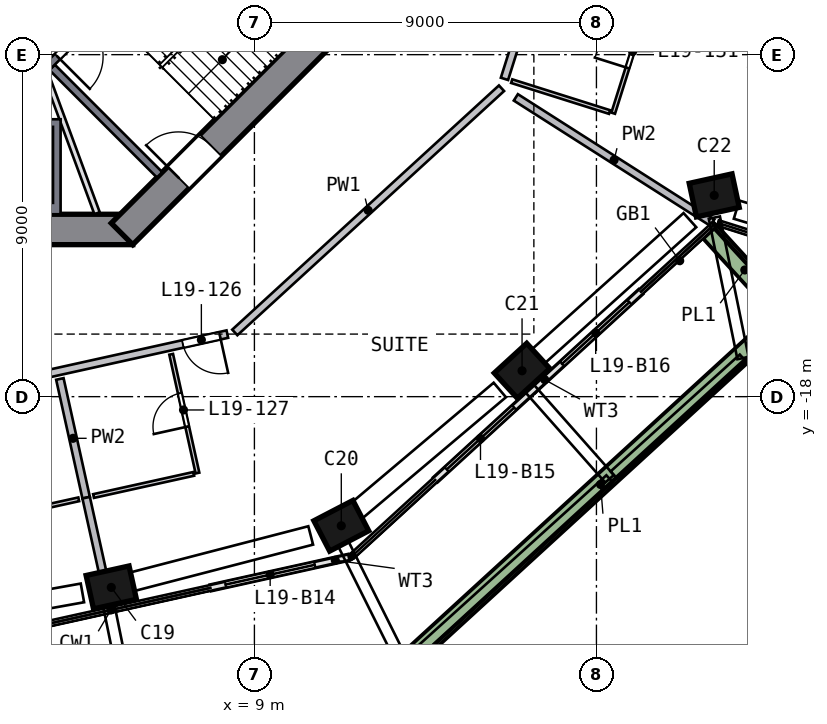
"""IFC4 building model, lengths in metres.
Left out: names, types, materials, properties, quantities, classifications, styles, units other than length and angle.
Written with IfcOpenShell. Run it as: python <this file> out.ifc"""

import sys

from ifc_helpers import new_model, si_unit, direction, frame, frame_2d, origin, origin_2d, place, context, subcontext, project, spatial, polyline, rectangle, outline, extrude, element, fill, save


model = new_model("IFC4")
c1 = context("Model", 3, precision=1e-05, world=origin(), true_north=direction((0.0, 1.0)))
c2 = subcontext(c1, "Body", "Model", "MODEL_VIEW")
j1 = project(units=[si_unit("LENGTHUNIT", "METRE"), si_unit("PLANEANGLEUNIT", "RADIAN")], contexts=[c1])
p1 = place(None, origin())
s1 = spatial("IfcSite", under=j1, at=p1, CompositionType="ELEMENT")
p2 = place(p1, origin())
s2 = spatial("IfcBuilding", under=s1, at=p2, CompositionType="ELEMENT")
p3 = place(p2, frame((0.0, 0.0, 86.0)))
s3 = spatial("IfcBuildingStorey", under=s2, at=p3, CompositionType="ELEMENT", Elevation=86.0)
p4 = place(p3, frame((5.102, -23.051, 0.0), z_axis=(0.109436366, 0.025248696, 0.993673078), x_axis=(0.970098725, 0.215163997, -0.112307249)))
e1 = element("IfcColumn", 1, at=p4, inside=s3, PredefinedType="COLUMN", context=c2, shape_type="SweptSolid", body=[
    extrude(rectangle(XDim=1.15, YDim=0.9, at=origin_2d()), origin(), (0.0, 0.0, 1.0), 3.21),
])
p5 = place(p3, frame((11.163, -21.463, 0.0), z_axis=(0.101646695, 0.053978424, 0.993355062), x_axis=(-0.881248043, -0.458428957, 0.115085963)))
e2 = element("IfcColumn", 2, at=p5, inside=s3, PredefinedType="COLUMN", context=c2, shape_type="SweptSolid", body=[
    extrude(rectangle(XDim=1.15, YDim=0.9, at=origin_2d()), origin(), (0.0, 0.0, 1.0), 3.211),
])
p6 = place(p3, frame((15.944, -17.412, 0.0), z_axis=(0.08213443, 0.076582751, 0.993674503), x_axis=(0.732490696, 0.671451632, -0.112294638)))
e3 = element("IfcColumn", 3, at=p6, inside=s3, PredefinedType="COLUMN", context=c2, shape_type="SweptSolid", body=[
    extrude(rectangle(XDim=1.15, YDim=0.9, at=origin_2d()), origin(), (0.0, 0.0, 1.0), 3.21),
])
p7 = place(p3, frame((21.027, -12.825, 0.0), z_axis=(0.060122333, 0.100482585, 0.993120615), x_axis=(-0.974668145, -0.20880815, 0.080132166)))
e4 = element("IfcColumn", 4, at=p7, inside=s3, PredefinedType="COLUMN", context=c2, shape_type="SweptSolid", body=[
    extrude(rectangle(XDim=1.15, YDim=0.9, at=origin_2d()), origin(), (0.0, 0.0, 1.0), 3.212),
])
p8 = place(p3, frame((-5.799, -13.6, 0.0), z_axis=(0.0, 0.0, 1.0), x_axis=(1.0, 0.0, 0.0)))
e5 = element("IfcWall", 5, at=p8, inside=s3, PredefinedType="SHEAR", context=c2, shape_type="SweptSolid", body=[
    extrude(rectangle(XDim=11.598, YDim=0.8, at=frame_2d((5.799, 0.0))), origin(), (0.0, 0.0, 1.0), 3.5),
])
p9 = place(p8, frame((4.899, 0.0, 0.0)))
e6 = element("IfcOpeningElement", 6, at=p9, cuts=e5, PredefinedType="OPENING", context=c2, shape_type="SweptSolid", body=[
    extrude(rectangle(XDim=1.8, YDim=2.1, at=frame_2d((0.9, 1.05))), frame((0.0, 0.41, 0.0), z_axis=(0.0, -1.0, 0.0), x_axis=(1.0, 0.0, 0.0)), (0.0, 0.0, 1.0), 0.82),
])
p10 = place(p3, frame((5.516, -13.717, 0.0), z_axis=(0.0, 0.0, 1.0), x_axis=(0.707106781, 0.707106781, 0.0)))
e7 = element("IfcWall", 7, at=p10, inside=s3, PredefinedType="SHEAR", context=c2, shape_type="SweptSolid", body=[
    extrude(rectangle(XDim=11.598, YDim=0.8, at=frame_2d((5.799, 0.0))), origin(), (0.0, 0.0, 1.0), 3.5),
])
p11 = place(p10, frame((2.099, 0.0, 0.0)))
e8 = element("IfcOpeningElement", 8, at=p11, cuts=e7, PredefinedType="OPENING", context=c2, shape_type="SweptSolid", body=[
    extrude(rectangle(XDim=1.2, YDim=2.1, at=frame_2d((0.6, 1.05))), frame((0.0, 0.41, 0.0), z_axis=(0.0, -1.0, 0.0), x_axis=(1.0, 0.0, 0.0)), (0.0, 0.0, 1.0), 0.82),
])
p12 = place(p3, frame((7.852, -23.031, 0.0), z_axis=(0.0, 0.0, 1.0), x_axis=(0.976372496, 0.216094304, 0.0)))
e9 = element("IfcWall", 9, at=p12, inside=s3, PredefinedType="SOLIDWALL", context=c2, shape_type="SweptSolid", body=[
    extrude(rectangle(XDim=3.71, YDim=0.15, at=frame_2d((1.855, 0.0))), origin(), (0.0, 0.0, 1.0), 2.425),
])
p13 = place(p12, frame((0.4, 0.0, 0.0)))
e10 = element("IfcOpeningElement", 10, at=p13, cuts=e9, PredefinedType="OPENING", context=c2, shape_type="SweptSolid", body=[
    extrude(rectangle(XDim=2.4, YDim=2.4, at=frame_2d((1.2, 1.2))), frame((0.0, 0.085, 0.0), z_axis=(0.0, -1.0, 0.0), x_axis=(1.0, 0.0, 0.0)), (0.0, 0.0, 1.0), 0.17),
])
p14 = place(p3, frame((13.769, -20.182, 0.0), z_axis=(0.0, 0.0, 1.0), x_axis=(0.737477764, 0.675371415, 0.0)))
e11 = element("IfcWall", 11, at=p14, inside=s3, PredefinedType="SOLIDWALL", context=c2, shape_type="SweptSolid", body=[
    extrude(rectangle(XDim=3.475, YDim=0.15, at=frame_2d((1.738, 0.0))), origin(), (0.0, 0.0, 1.0), 2.425),
])
p15 = place(p14, frame((0.4, 0.0, 0.0)))
e12 = element("IfcOpeningElement", 12, at=p15, cuts=e11, PredefinedType="OPENING", context=c2, shape_type="SweptSolid", body=[
    extrude(rectangle(XDim=2.4, YDim=2.4, at=frame_2d((1.2, 1.2))), frame((0.0, 0.085, 0.0), z_axis=(0.0, -1.0, 0.0), x_axis=(1.0, 0.0, 0.0)), (0.0, 0.0, 1.0), 0.17),
])
p16 = place(p3, frame((16.332, -17.835, 0.0), z_axis=(0.0, 0.0, 1.0), x_axis=(0.737547703, 0.675295036, 0.0)))
e13 = element("IfcWall", 13, at=p16, inside=s3, PredefinedType="SOLIDWALL", context=c2, shape_type="SweptSolid", body=[
    extrude(rectangle(XDim=3.835, YDim=0.15, at=frame_2d((1.918, 0.0))), origin(), (0.0, 0.0, 1.0), 2.425),
])
p17 = place(p16, frame((1.035, 0.0, 0.0)))
e14 = element("IfcOpeningElement", 14, at=p17, cuts=e13, PredefinedType="OPENING", context=c2, shape_type="SweptSolid", body=[
    extrude(rectangle(XDim=2.4, YDim=2.4, at=frame_2d((1.2, 1.2))), frame((0.0, 0.085, 0.0), z_axis=(0.0, -1.0, 0.0), x_axis=(1.0, 0.0, 0.0)), (0.0, 0.0, 1.0), 0.17),
])
p18 = place(p3, frame((13.047, -24.945, 0.0), z_axis=(0.0, 0.0, 1.0), x_axis=(0.737502592, 0.675344302, 0.0)))
e15 = element("IfcWall", 15, at=p18, inside=s3, PredefinedType="SOLIDWALL", context=c2, shape_type="SweptSolid", body=[
    extrude(rectangle(XDim=13.723, YDim=0.5, at=frame_2d((6.862, 0.0))), origin(), (0.0, 0.0, 1.0), 0.7),
])
p19 = place(p3, frame((22.815, -15.661, 0.0), z_axis=(0.0, 0.0, 1.0), x_axis=(-0.675257533, 0.737582039, 0.0)))
e16 = element("IfcWall", 16, at=p19, inside=s3, PredefinedType="SOLIDWALL", context=c2, shape_type="SweptSolid", body=[
    extrude(rectangle(XDim=2.699, YDim=0.5, at=frame_2d((1.35, 0.0))), origin(), (0.0, 0.0, 1.0), 0.7),
])
p20 = place(p3, origin())
e17 = element("IfcWall", 17, at=p20, inside=s3, PredefinedType="SOLIDWALL", context=c2, shape_type="SweptSolid", body=[
    extrude(outline(polyline([(3.9, -10.7), (3.9, -13.2), (1.2, -13.2), (1.2, -10.7), (3.9, -10.7)]), holes=[polyline([(1.4, -12.9), (3.7, -12.9), (3.7, -10.9), (1.4, -10.9), (1.4, -12.9)])]), origin(), (0.0, 0.0, 1.0), 3.19),
])
p21 = place(p3, frame((9.334, -3.535, 0.0), z_axis=(0.0, 0.0, 1.0), x_axis=(-0.707106781, -0.707106781, 0.0)))
e18 = element("IfcWall", 18, at=p21, inside=s3, PredefinedType="SOLIDWALL", context=c2, shape_type="SweptSolid", body=[
    extrude(rectangle(XDim=8.2, YDim=0.2, at=frame_2d((4.1, 0.0))), origin(), (0.0, 0.0, 1.0), 3.19),
])
p22 = place(p21, frame((6.6, 0.0, 0.0)))
e19 = element("IfcOpeningElement", 19, at=p22, cuts=e18, PredefinedType="OPENING", context=c2, shape_type="SweptSolid", body=[
    extrude(rectangle(XDim=1.2, YDim=2.1, at=frame_2d((0.6, 1.05))), frame((0.0, 0.11, 0.0), z_axis=(0.0, -1.0, 0.0), x_axis=(1.0, 0.0, 0.0)), (0.0, 0.0, 1.0), 0.22),
])
p23 = place(p3, frame((3.677, -9.334, 0.0), z_axis=(0.0, 0.0, 1.0), x_axis=(0.707106781, -0.707106781, 0.0)))
e20 = element("IfcWall", 20, at=p23, inside=s3, PredefinedType="SOLIDWALL", context=c2, shape_type="SweptSolid", body=[
    extrude(rectangle(XDim=4.0, YDim=0.2, at=frame_2d((2.0, 0.0))), origin(), (0.0, 0.0, 1.0), 3.19),
])
p24 = place(p3, frame((1.776, -4.813, 0.0), z_axis=(0.0, 0.0, 1.0), x_axis=(0.346115488, -0.938191915, 0.0)))
e21 = element("IfcWall", 21, at=p24, inside=s3, PredefinedType="PARTITIONING", context=c2, shape_type="SweptSolid", body=[
    extrude(rectangle(XDim=8.91, YDim=0.15, at=frame_2d((4.455, 0.0))), origin(), (0.0, 0.0, 1.0), 3.19),
])
p25 = place(p24, frame((1.4, 0.0, 0.0)))
e22 = element("IfcOpeningElement", 22, at=p25, cuts=e21, PredefinedType="OPENING", context=c2, shape_type="SweptSolid", body=[
    extrude(rectangle(XDim=1.8, YDim=2.1, at=frame_2d((0.9, 1.05))), frame((0.0, 0.085, 0.0), z_axis=(0.0, -1.0, 0.0), x_axis=(1.0, 0.0, 0.0)), (0.0, 0.0, 1.0), 0.17),
])
p26 = place(p3, frame((8.288, -16.354, 0.0), z_axis=(0.0, 0.0, 1.0), x_axis=(-0.976371341, -0.216099524, 0.0)))
e23 = element("IfcWall", 23, at=p26, inside=s3, PredefinedType="SOLIDWALL", context=c2, shape_type="SweptSolid", body=[
    extrude(rectangle(XDim=9.116, YDim=0.2, at=frame_2d((4.558, 0.0))), origin(), (0.0, 0.0, 1.0), 3.19),
])
p27 = place(p26, frame((0.2, 0.0, 0.0)))
e24 = element("IfcOpeningElement", 24, at=p27, cuts=e23, PredefinedType="OPENING", context=c2, shape_type="SweptSolid", body=[
    extrude(rectangle(XDim=1.0, YDim=2.1, at=frame_2d((0.5, 1.05))), frame((0.0, 0.11, 0.0), z_axis=(0.0, -1.0, 0.0), x_axis=(1.0, 0.0, 0.0)), (0.0, 0.0, 1.0), 0.22),
])
p28 = place(p3, frame((8.484, -16.31, 0.0), z_axis=(0.0, 0.0, 1.0), x_axis=(0.737517179, 0.675328372, 0.0)))
e25 = element("IfcWall", 25, at=p28, inside=s3, PredefinedType="SOLIDWALL", context=c2, shape_type="SweptSolid", body=[
    extrude(rectangle(XDim=9.516, YDim=0.2, at=frame_2d((4.758, 0.0))), origin(), (0.0, 0.0, 1.0), 3.19),
])
p29 = place(p3, frame((15.58, -9.637, 0.0), z_axis=(0.0, 0.0, 1.0), x_axis=(0.301086692, 0.953596772, 0.0)))
e26 = element("IfcWall", 26, at=p29, inside=s3, PredefinedType="SOLIDWALL", context=c2, shape_type="SweptSolid", body=[
    extrude(rectangle(XDim=3.4, YDim=0.2, at=frame_2d((1.7, 0.0))), origin(), (0.0, 0.0, 1.0), 3.19),
])
p30 = place(p3, frame((16.794, -6.455, 0.0), z_axis=(0.0, 0.0, 1.0), x_axis=(0.953611503, -0.301040034, 0.0)))
e27 = element("IfcWall", 27, at=p30, inside=s3, PredefinedType="SOLIDWALL", context=c2, shape_type="SweptSolid", body=[
    extrude(rectangle(XDim=13.689, YDim=0.2, at=frame_2d((6.844, 0.0))), origin(), (0.0, 0.0, 1.0), 3.19),
])
p31 = place(p3, frame((3.881, -17.534, 0.0), z_axis=(0.0, 0.0, 1.0), x_axis=(0.216057954, -0.976380541, 0.0)))
e28 = element("IfcWall", 28, at=p31, inside=s3, PredefinedType="SOLIDWALL", context=c2, shape_type="SweptSolid", body=[
    extrude(rectangle(XDim=3.2, YDim=0.2, at=frame_2d((1.6, 0.0))), origin(), (0.0, 0.0, 1.0), 3.19),
])
p32 = place(p3, frame((4.572, -20.658, 0.0), z_axis=(0.0, 0.0, 1.0), x_axis=(0.216080405, -0.976375572, 0.0)))
e29 = element("IfcWall", 29, at=p32, inside=s3, PredefinedType="SOLIDWALL", context=c2, shape_type="SweptSolid", body=[
    extrude(rectangle(XDim=2.95, YDim=0.2, at=frame_2d((1.475, 0.0))), origin(), (0.0, 0.0, 1.0), 3.19),
])
p33 = place(p3, frame((15.879, -10.124, 0.0), z_axis=(0.0, 0.0, 1.0), x_axis=(0.843220205, -0.537568308, 0.0)))
e30 = element("IfcWall", 30, at=p33, inside=s3, PredefinedType="SOLIDWALL", context=c2, shape_type="SweptSolid", body=[
    extrude(rectangle(XDim=6.132, YDim=0.2, at=frame_2d((3.066, 0.0))), origin(), (0.0, 0.0, 1.0), 3.19),
])
for number, where, z_axis, x_axis in (
    (31, (1.741, -21.285, 0.0), (0.0, 0.0, 1.0), (0.976, 0.216, 0.0)),
    (32, (7.404, -20.032, 0.0), (0.0, 0.0, 1.0), (-0.976, -0.216, 0.0)),
):
    element("IfcWall", number, at=place(p3, frame(where, z_axis=z_axis, x_axis=x_axis)), inside=s3, PredefinedType="PARTITIONING", context=c2, shape_type="SweptSolid", body=[
        extrude(rectangle(XDim=2.7, YDim=0.1, at=frame_2d((1.35, 0.0))), origin(), (0.0, 0.0, 1.0), 3.19),
    ])
p34 = place(p3, frame((7.501, -20.01, 0.0), z_axis=(0.0, 0.0, 1.0), x_axis=(-0.216146782, 0.97636088, 0.0)))
e33 = element("IfcWall", 33, at=p34, inside=s3, PredefinedType="PARTITIONING", context=c2, shape_type="SweptSolid", body=[
    extrude(rectangle(XDim=3.2, YDim=0.1, at=frame_2d((1.6, 0.0))), origin(), (0.0, 0.0, 1.0), 3.19),
])
p35 = place(p34, frame((1.25, 0.0, 0.0)))
e34 = element("IfcOpeningElement", 34, at=p35, cuts=e33, PredefinedType="OPENING", context=c2, shape_type="SweptSolid", body=[
    extrude(rectangle(XDim=0.9, YDim=2.1, at=frame_2d((0.45, 1.05))), frame((0.0, 0.06, 0.0), z_axis=(0.0, -1.0, 0.0), x_axis=(1.0, 0.0, 0.0)), (0.0, 0.0, 1.0), 0.12),
])
p36 = place(p3, frame((15.771, -9.698, 0.0), z_axis=(0.0, 0.0, 1.0), x_axis=(0.953625017, -0.30099722, 0.0)))
e35 = element("IfcWall", 35, at=p36, inside=s3, PredefinedType="PARTITIONING", context=c2, shape_type="SweptSolid", body=[
    extrude(rectangle(XDim=2.7, YDim=0.1, at=frame_2d((1.35, 0.0))), origin(), (0.0, 0.0, 1.0), 3.19),
])
p37 = place(p3, frame((18.441, -10.54, 0.0), z_axis=(0.0, 0.0, 1.0), x_axis=(0.30105834, 0.953605724, 0.0)))
e36 = element("IfcWall", 36, at=p37, inside=s3, PredefinedType="PARTITIONING", context=c2, shape_type="SweptSolid", body=[
    extrude(rectangle(XDim=3.2, YDim=0.1, at=frame_2d((1.6, 0.0))), origin(), (0.0, 0.0, 1.0), 3.19),
])
p38 = place(p37, frame((1.25, 0.0, 0.0)))
e37 = element("IfcOpeningElement", 37, at=p38, cuts=e36, PredefinedType="OPENING", context=c2, shape_type="SweptSolid", body=[
    extrude(rectangle(XDim=0.9, YDim=2.1, at=frame_2d((0.45, 1.05))), frame((0.0, 0.06, 0.0), z_axis=(0.0, -1.0, 0.0), x_axis=(1.0, 0.0, 0.0)), (0.0, 0.0, 1.0), 0.12),
])
p39 = place(p13, origin())
e38 = element("IfcDoor", 38, at=p39, inside=s3, OperationType="SLIDING_TO_RIGHT", PredefinedType="DOOR", context=c2, shape_type="SweptSolid", body=[
    extrude(rectangle(XDim=2.4, YDim=2.4, at=frame_2d((1.2, 1.2))), frame((0.0, 0.025, 0.0), z_axis=(0.0, -1.0, 0.0), x_axis=(1.0, 0.0, 0.0)), (0.0, 0.0, 1.0), 0.05),
])
fill(e10, e38)
p40 = place(p15, origin())
e39 = element("IfcDoor", 39, at=p40, inside=s3, OperationType="SLIDING_TO_RIGHT", PredefinedType="DOOR", context=c2, shape_type="SweptSolid", body=[
    extrude(rectangle(XDim=2.4, YDim=2.4, at=frame_2d((1.2, 1.2))), frame((0.0, 0.025, 0.0), z_axis=(0.0, -1.0, 0.0), x_axis=(1.0, 0.0, 0.0)), (0.0, 0.0, 1.0), 0.05),
])
fill(e12, e39)
p41 = place(p17, origin())
e40 = element("IfcDoor", 40, at=p41, inside=s3, OperationType="SLIDING_TO_LEFT", PredefinedType="DOOR", context=c2, shape_type="SweptSolid", body=[
    extrude(rectangle(XDim=2.4, YDim=2.4, at=frame_2d((1.2, 1.2))), frame((0.0, 0.025, 0.0), z_axis=(0.0, -1.0, 0.0), x_axis=(1.0, 0.0, 0.0)), (0.0, 0.0, 1.0), 0.05),
])
fill(e14, e40)
p42 = place(p22, origin())
e41 = element("IfcDoor", 41, at=p42, inside=s3, OperationType="SINGLE_SWING_RIGHT", PredefinedType="DOOR", context=c2, shape_type="SweptSolid", body=[
    extrude(rectangle(XDim=1.2, YDim=2.1, at=frame_2d((0.6, 1.05))), frame((0.0, 0.025, 0.0), z_axis=(0.0, -1.0, 0.0), x_axis=(1.0, 0.0, 0.0)), (0.0, 0.0, 1.0), 0.05),
])
fill(e19, e41)
p43 = place(p11, origin())
e42 = element("IfcDoor", 42, at=p43, inside=s3, OperationType="SINGLE_SWING_LEFT", PredefinedType="DOOR", context=c2, shape_type="SweptSolid", body=[
    extrude(rectangle(XDim=1.2, YDim=2.1, at=frame_2d((0.6, 1.05))), frame((0.0, 0.025, 0.0), z_axis=(0.0, -1.0, 0.0), x_axis=(1.0, 0.0, 0.0)), (0.0, 0.0, 1.0), 0.05),
])
fill(e8, e42)
p44 = place(p27, origin())
e43 = element("IfcDoor", 43, at=p44, inside=s3, OperationType="SINGLE_SWING_LEFT", PredefinedType="DOOR", context=c2, shape_type="SweptSolid", body=[
    extrude(rectangle(XDim=1.0, YDim=2.1, at=frame_2d((0.5, 1.05))), frame((0.0, 0.025, 0.0), z_axis=(0.0, -1.0, 0.0), x_axis=(1.0, 0.0, 0.0)), (0.0, 0.0, 1.0), 0.05),
])
fill(e24, e43)
p45 = place(p35, origin())
e44 = element("IfcDoor", 44, at=p45, inside=s3, OperationType="SINGLE_SWING_LEFT", PredefinedType="DOOR", context=c2, shape_type="SweptSolid", body=[
    extrude(rectangle(XDim=0.9, YDim=2.1, at=frame_2d((0.45, 1.05))), frame((0.0, 0.025, 0.0), z_axis=(0.0, -1.0, 0.0), x_axis=(1.0, 0.0, 0.0)), (0.0, 0.0, 1.0), 0.05),
])
fill(e34, e44)
p46 = place(p38, origin())
e45 = element("IfcDoor", 45, at=p46, inside=s3, OperationType="SINGLE_SWING_LEFT", PredefinedType="DOOR", context=c2, shape_type="SweptSolid", body=[
    extrude(rectangle(XDim=0.9, YDim=2.1, at=frame_2d((0.45, 1.05))), frame((0.0, 0.025, 0.0), z_axis=(0.0, -1.0, 0.0), x_axis=(1.0, 0.0, 0.0)), (0.0, 0.0, 1.0), 0.05),
])
fill(e37, e45)
save(model, sys.argv[1])
